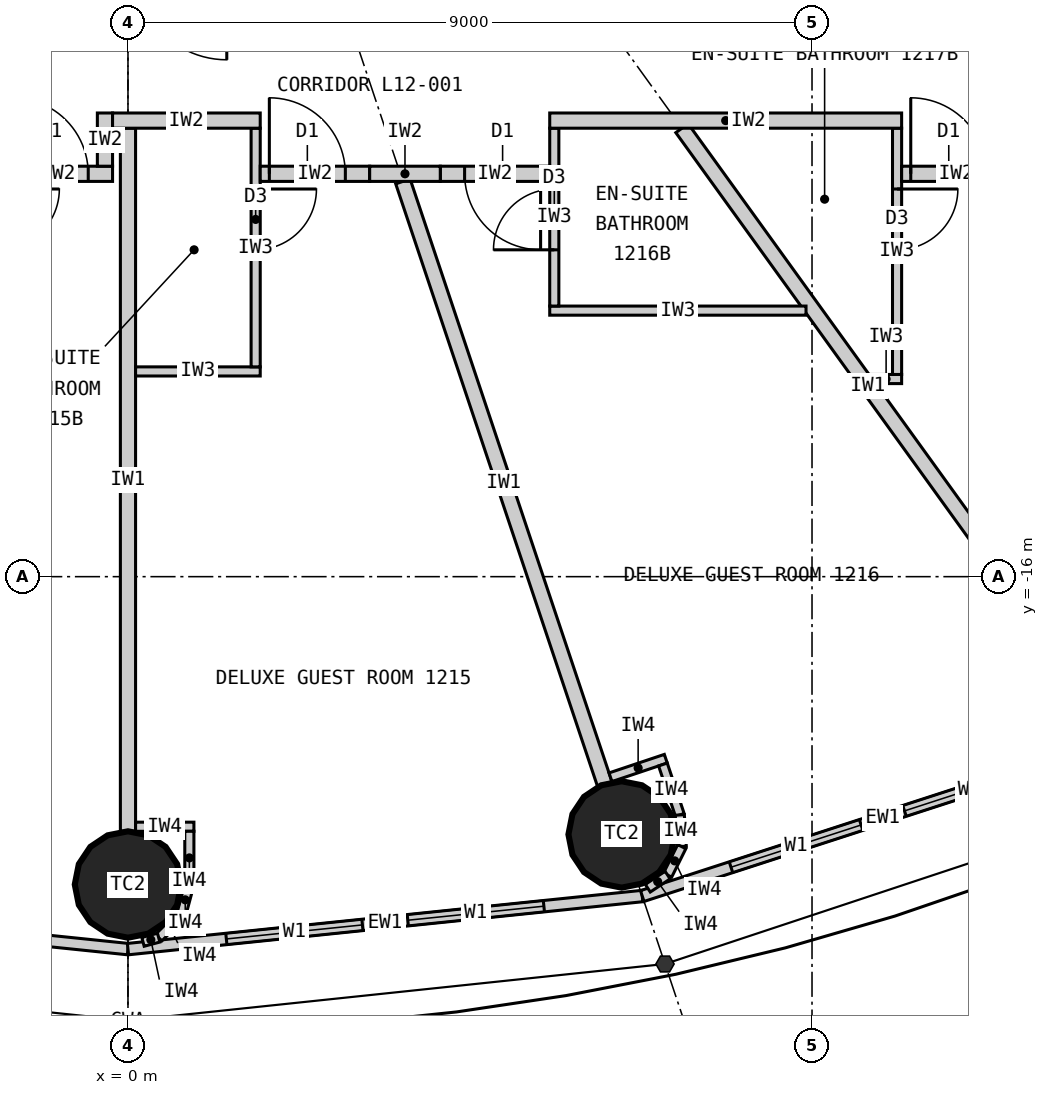
"""IFC4 building model, lengths in metres.
Left out: names, types, materials, properties, quantities, classifications, styles, units other than length and angle.
Written with IfcOpenShell. Run it as: python <this file> out.ifc"""

import sys

from ifc_helpers import new_model, si_unit, direction, frame, frame_2d, origin, origin_2d, place, context, subcontext, project, spatial, rectangle, circle, extrude, element, fill, save


model = new_model("IFC4")
c1 = context("Model", 3, precision=1e-05, world=origin(), true_north=direction((0.0, 1.0)))
c2 = subcontext(c1, "Body", "Model", "MODEL_VIEW")
j1 = project(units=[si_unit("LENGTHUNIT", "METRE"), si_unit("PLANEANGLEUNIT", "RADIAN")], contexts=[c1])
p1 = place(None, origin())
s1 = spatial("IfcSite", under=j1, at=p1, CompositionType="ELEMENT")
p2 = place(p1, origin())
s2 = spatial("IfcBuilding", under=s1, at=p2, CompositionType="ELEMENT")
p3 = place(p2, frame((0.0, 0.0, 54.0)))
s3 = spatial("IfcBuildingStorey", under=s2, at=p3, CompositionType="ELEMENT", Elevation=54.0)
for number, where, z_axis, x_axis in (
    (1, (0.0, -20.05, 0.0), (0.0, 0.0, 1.0), (1.0, 0.0, 0.0)),
    (2, (6.495, -19.391, 0.0), (0.0, 0.0, 1.0), (1.0, 0.0, 0.0)),
):
    element("IfcColumn", number, at=place(p3, frame(where, z_axis=z_axis, x_axis=x_axis)), inside=s3, PredefinedType="COLUMN", context=c2, shape_type="SweptSolid", body=[
        extrude(circle(Radius=0.7, at=origin_2d()), origin(), (0.0, 0.0, 1.0), 3.3),
    ])
p4 = place(p3, frame((-6.766, -20.202, 0.0), z_axis=(0.0, 0.0, 1.0), x_axis=(0.994721394369, -0.102612609291, 0.0)))
e3 = element("IfcWall", 3, at=p4, inside=s3, PredefinedType="ELEMENTEDWALL", context=c2, shape_type="SweptSolid", body=[
    extrude(rectangle(XDim=6.802, YDim=0.15, at=frame_2d((3.401, 0.0))), origin(), (0.0, 0.0, 1.0), 3.12),
])
p5 = place(p4, frame((1.301, 0.0, 0.9)))
e4 = element("IfcOpeningElement", 4, at=p5, cuts=e3, PredefinedType="OPENING", context=c2, shape_type="SweptSolid", body=[
    extrude(rectangle(XDim=1.8, YDim=1.9, at=frame_2d((0.9, 0.95))), frame((0.0, 0.085, 0.0), z_axis=(0.0, -1.0, 0.0), x_axis=(1.0, 0.0, 0.0)), (0.0, 0.0, 1.0), 0.17),
])
p6 = place(p4, frame((3.701, 0.0, 0.9)))
e5 = element("IfcOpeningElement", 5, at=p6, cuts=e3, PredefinedType="OPENING", context=c2, shape_type="SweptSolid", body=[
    extrude(rectangle(XDim=1.8, YDim=1.9, at=frame_2d((0.9, 0.95))), frame((0.0, 0.085, 0.0), z_axis=(0.0, -1.0, 0.0), x_axis=(1.0, 0.0, 0.0)), (0.0, 0.0, 1.0), 0.17),
])
p7 = place(p3, frame((0.0, -20.9, 0.0), z_axis=(0.0, 0.0, 1.0), x_axis=(0.994721394369, 0.102612609291, 0.0)))
e6 = element("IfcWall", 6, at=p7, inside=s3, PredefinedType="ELEMENTEDWALL", context=c2, shape_type="SweptSolid", body=[
    extrude(rectangle(XDim=6.802, YDim=0.15, at=frame_2d((3.401, 0.0))), origin(), (0.0, 0.0, 1.0), 3.12),
])
p8 = place(p7, frame((1.301, 0.0, 0.9)))
e7 = element("IfcOpeningElement", 7, at=p8, cuts=e6, PredefinedType="OPENING", context=c2, shape_type="SweptSolid", body=[
    extrude(rectangle(XDim=1.8, YDim=1.9, at=frame_2d((0.9, 0.95))), frame((0.0, 0.085, 0.0), z_axis=(0.0, -1.0, 0.0), x_axis=(1.0, 0.0, 0.0)), (0.0, 0.0, 1.0), 0.17),
])
p9 = place(p7, frame((3.701, 0.0, 0.9)))
e8 = element("IfcOpeningElement", 8, at=p9, cuts=e6, PredefinedType="OPENING", context=c2, shape_type="SweptSolid", body=[
    extrude(rectangle(XDim=1.8, YDim=1.9, at=frame_2d((0.9, 0.95))), frame((0.0, 0.085, 0.0), z_axis=(0.0, -1.0, 0.0), x_axis=(1.0, 0.0, 0.0)), (0.0, 0.0, 1.0), 0.17),
])
p10 = place(p3, frame((6.766, -20.202, 0.0), z_axis=(0.0, 0.0, 1.0), x_axis=(0.951137534625, 0.308767534285, 0.0)))
e9 = element("IfcWall", 9, at=p10, inside=s3, PredefinedType="ELEMENTEDWALL", context=c2, shape_type="SweptSolid", body=[
    extrude(rectangle(XDim=6.655, YDim=0.15, at=frame_2d((3.328, 0.0))), origin(), (0.0, 0.0, 1.0), 3.12),
])
p11 = place(p10, frame((1.228, 0.0, 0.9)))
e10 = element("IfcOpeningElement", 10, at=p11, cuts=e9, PredefinedType="OPENING", context=c2, shape_type="SweptSolid", body=[
    extrude(rectangle(XDim=1.8, YDim=1.9, at=frame_2d((0.9, 0.95))), frame((0.0, 0.085, 0.0), z_axis=(0.0, -1.0, 0.0), x_axis=(1.0, 0.0, 0.0)), (0.0, 0.0, 1.0), 0.17),
])
p12 = place(p10, frame((3.628, 0.0, 0.9)))
e11 = element("IfcOpeningElement", 11, at=p12, cuts=e9, PredefinedType="OPENING", context=c2, shape_type="SweptSolid", body=[
    extrude(rectangle(XDim=1.8, YDim=1.9, at=frame_2d((0.9, 0.95))), frame((0.0, 0.085, 0.0), z_axis=(0.0, -1.0, 0.0), x_axis=(1.0, 0.0, 0.0)), (0.0, 0.0, 1.0), 0.17),
])
p13 = place(p3, frame((0.0, -10.1, 0.0), z_axis=(0.0, 0.0, 1.0), x_axis=(0.0, -1.0, 0.0)))
e12 = element("IfcWall", 12, at=p13, inside=s3, PredefinedType="PARTITIONING", context=c2, shape_type="SweptSolid", body=[
    extrude(rectangle(XDim=9.25, YDim=0.2, at=frame_2d((4.625, 0.0))), origin(), (0.0, 0.0, 1.0), 2.32),
])
p14 = place(p3, frame((3.617, -10.8, 0.0), z_axis=(0.0, 0.0, 1.0), x_axis=(0.317576599239, -0.948232621046, 0.0)))
e13 = element("IfcWall", 13, at=p14, inside=s3, PredefinedType="PARTITIONING", context=c2, shape_type="SweptSolid", body=[
    extrude(rectangle(XDim=8.36, YDim=0.2, at=frame_2d((4.18, 0.0))), origin(), (0.0, 0.0, 1.0), 2.32),
])
p15 = place(p3, frame((7.289, -10.1, 0.0), z_axis=(0.0, 0.0, 1.0), x_axis=(0.585198353053, -0.810890182197, 0.0)))
e14 = element("IfcWall", 14, at=p15, inside=s3, PredefinedType="PARTITIONING", context=c2, shape_type="SweptSolid", body=[
    extrude(rectangle(XDim=8.36, YDim=0.2, at=frame_2d((4.18, 0.0))), origin(), (0.0, 0.0, 1.0), 2.32),
])
p16 = place(p3, frame((0.1, -13.3, 0.0), z_axis=(0.0, 0.0, 1.0), x_axis=(1.0, 0.0, 0.0)))
e15 = element("IfcWall", 15, at=p16, inside=s3, PredefinedType="PARTITIONING", context=c2, shape_type="SweptSolid", body=[
    extrude(rectangle(XDim=1.64, YDim=0.12, at=frame_2d((0.82, 0.0))), origin(), (0.0, 0.0, 1.0), 3.12),
])
p17 = place(p3, frame((1.68, -10.1, 0.0), z_axis=(0.0, 0.0, 1.0), x_axis=(0.0, -1.0, 0.0)))
e16 = element("IfcWall", 16, at=p17, inside=s3, PredefinedType="PARTITIONING", context=c2, shape_type="SweptSolid", body=[
    extrude(rectangle(XDim=3.14, YDim=0.12, at=frame_2d((1.57, 0.0))), origin(), (0.0, 0.0, 1.0), 3.12),
])
p18 = place(p17, frame((0.8, 0.0, 0.0)))
e17 = element("IfcOpeningElement", 17, at=p18, cuts=e16, PredefinedType="OPENING", context=c2, shape_type="SweptSolid", body=[
    extrude(rectangle(XDim=0.8, YDim=2.1, at=frame_2d((0.4, 1.05))), frame((0.0, 0.07, 0.0), z_axis=(0.0, -1.0, 0.0), x_axis=(1.0, 0.0, 0.0)), (0.0, 0.0, 1.0), 0.14),
])
p19 = place(p3, frame((8.921, -12.5, 0.0), z_axis=(0.0, 0.0, 1.0), x_axis=(-1.0, 0.0, 0.0)))
e18 = element("IfcWall", 18, at=p19, inside=s3, PredefinedType="PARTITIONING", context=c2, shape_type="SweptSolid", body=[
    extrude(rectangle(XDim=3.372, YDim=0.12, at=frame_2d((1.686, 0.0))), origin(), (0.0, 0.0, 1.0), 3.12),
])
p20 = place(p3, frame((5.609, -10.1, 0.0), z_axis=(0.0, 0.0, 1.0), x_axis=(0.0, -1.0, 0.0)))
e19 = element("IfcWall", 19, at=p20, inside=s3, PredefinedType="PARTITIONING", context=c2, shape_type="SweptSolid", body=[
    extrude(rectangle(XDim=2.34, YDim=0.12, at=frame_2d((1.17, 0.0))), origin(), (0.0, 0.0, 1.0), 3.12),
])
p21 = place(p20, frame((0.8, 0.0, 0.0)))
e20 = element("IfcOpeningElement", 20, at=p21, cuts=e19, PredefinedType="OPENING", context=c2, shape_type="SweptSolid", body=[
    extrude(rectangle(XDim=0.8, YDim=2.1, at=frame_2d((0.4, 1.05))), frame((0.0, 0.07, 0.0), z_axis=(0.0, -1.0, 0.0), x_axis=(1.0, 0.0, 0.0)), (0.0, 0.0, 1.0), 0.14),
])
p22 = place(p3, frame((9.771, -13.4, 0.0), z_axis=(0.0, 0.0, 1.0), x_axis=(1.0, 0.0, 0.0)))
e21 = element("IfcWall", 21, at=p22, inside=s3, PredefinedType="PARTITIONING", context=c2, shape_type="SweptSolid", body=[
    extrude(rectangle(XDim=0.408, YDim=0.12, at=frame_2d((0.204, 0.0))), origin(), (0.0, 0.0, 1.0), 3.12),
])
p23 = place(p3, frame((10.119, -10.1, 0.0), z_axis=(0.0, 0.0, 1.0), x_axis=(0.0, -1.0, 0.0)))
e22 = element("IfcWall", 22, at=p23, inside=s3, PredefinedType="PARTITIONING", context=c2, shape_type="SweptSolid", body=[
    extrude(rectangle(XDim=3.24, YDim=0.12, at=frame_2d((1.62, 0.0))), origin(), (0.0, 0.0, 1.0), 3.12),
])
p24 = place(p23, frame((0.8, 0.0, 0.0)))
e23 = element("IfcOpeningElement", 23, at=p24, cuts=e22, PredefinedType="OPENING", context=c2, shape_type="SweptSolid", body=[
    extrude(rectangle(XDim=0.8, YDim=2.1, at=frame_2d((0.4, 1.05))), frame((0.0, 0.07, 0.0), z_axis=(0.0, -1.0, 0.0), x_axis=(1.0, 0.0, 0.0)), (0.0, 0.0, 1.0), 0.14),
])
p25 = place(p3, frame((-0.203, -10.7, 0.0), z_axis=(0.0, 0.0, 1.0), x_axis=(-1.0, 0.0, 0.0)))
e24 = element("IfcWall", 24, at=p25, inside=s3, PredefinedType="PARTITIONING", context=c2, shape_type="SweptSolid", body=[
    extrude(rectangle(XDim=1.44, YDim=0.2, at=frame_2d((0.72, 0.0))), origin(), (0.0, 0.0, 1.0), 3.12),
])
p26 = place(p25, frame((0.32, 0.0, 0.0)))
e25 = element("IfcOpeningElement", 25, at=p26, cuts=e24, PredefinedType="OPENING", context=c2, shape_type="SweptSolid", body=[
    extrude(rectangle(XDim=1.0, YDim=2.2, at=frame_2d((0.5, 1.1))), frame((0.0, 0.11, 0.0), z_axis=(0.0, -1.0, 0.0), x_axis=(1.0, 0.0, 0.0)), (0.0, 0.0, 1.0), 0.22),
])
p27 = place(p3, frame((-0.303, -9.9, 0.0), z_axis=(0.0, 0.0, 1.0), x_axis=(0.0, -1.0, 0.0)))
e26 = element("IfcWall", 26, at=p27, inside=s3, PredefinedType="PARTITIONING", context=c2, shape_type="SweptSolid", body=[
    extrude(rectangle(XDim=0.7, YDim=0.2, at=frame_2d((0.35, 0.0))), origin(), (0.0, 0.0, 1.0), 3.12),
])
p28 = place(p3, frame((3.18, -10.7, 0.0), z_axis=(0.0, 0.0, 1.0), x_axis=(-1.0, 0.0, 0.0)))
e27 = element("IfcWall", 27, at=p28, inside=s3, PredefinedType="PARTITIONING", context=c2, shape_type="SweptSolid", body=[
    extrude(rectangle(XDim=1.44, YDim=0.2, at=frame_2d((0.72, 0.0))), origin(), (0.0, 0.0, 1.0), 3.12),
])
p29 = place(p28, frame((0.32, 0.0, 0.0)))
e28 = element("IfcOpeningElement", 28, at=p29, cuts=e27, PredefinedType="OPENING", context=c2, shape_type="SweptSolid", body=[
    extrude(rectangle(XDim=1.0, YDim=2.2, at=frame_2d((0.5, 1.1))), frame((0.0, 0.11, 0.0), z_axis=(0.0, -1.0, 0.0), x_axis=(1.0, 0.0, 0.0)), (0.0, 0.0, 1.0), 0.22),
])
p30 = place(p3, frame((5.549, -10.7, 0.0), z_axis=(0.0, 0.0, 1.0), x_axis=(-1.0, 0.0, 0.0)))
e29 = element("IfcWall", 29, at=p30, inside=s3, PredefinedType="PARTITIONING", context=c2, shape_type="SweptSolid", body=[
    extrude(rectangle(XDim=1.44, YDim=0.2, at=frame_2d((0.72, 0.0))), origin(), (0.0, 0.0, 1.0), 3.12),
])
p31 = place(p30, frame((0.12, 0.0, 0.0)))
e30 = element("IfcOpeningElement", 30, at=p31, cuts=e29, PredefinedType="OPENING", context=c2, shape_type="SweptSolid", body=[
    extrude(rectangle(XDim=1.0, YDim=2.2, at=frame_2d((0.5, 1.1))), frame((0.0, 0.11, 0.0), z_axis=(0.0, -1.0, 0.0), x_axis=(1.0, 0.0, 0.0)), (0.0, 0.0, 1.0), 0.22),
])
p32 = place(p3, frame((11.619, -10.7, 0.0), z_axis=(0.0, 0.0, 1.0), x_axis=(-1.0, 0.0, 0.0)))
e31 = element("IfcWall", 31, at=p32, inside=s3, PredefinedType="PARTITIONING", context=c2, shape_type="SweptSolid", body=[
    extrude(rectangle(XDim=1.44, YDim=0.2, at=frame_2d((0.72, 0.0))), origin(), (0.0, 0.0, 1.0), 3.12),
])
p33 = place(p32, frame((0.32, 0.0, 0.0)))
e32 = element("IfcOpeningElement", 32, at=p33, cuts=e31, PredefinedType="OPENING", context=c2, shape_type="SweptSolid", body=[
    extrude(rectangle(XDim=1.0, YDim=2.2, at=frame_2d((0.5, 1.1))), frame((0.0, 0.11, 0.0), z_axis=(0.0, -1.0, 0.0), x_axis=(1.0, 0.0, 0.0)), (0.0, 0.0, 1.0), 0.22),
])
p34 = place(p3, frame((4.109, -10.7, 0.0), z_axis=(0.0, 0.0, 1.0), x_axis=(-1.0, 0.0, 0.0)))
e33 = element("IfcWall", 33, at=p34, inside=s3, PredefinedType="PARTITIONING", context=c2, shape_type="SweptSolid", body=[
    extrude(rectangle(XDim=0.929, YDim=0.2, at=frame_2d((0.465, 0.0))), origin(), (0.0, 0.0, 1.0), 3.12),
])
p35 = place(p3, frame((10.179, -10.0, 0.0), z_axis=(0.0, 0.0, 1.0), x_axis=(-1.0, 0.0, 0.0)))
e34 = element("IfcWall", 34, at=p35, inside=s3, PredefinedType="PARTITIONING", context=c2, shape_type="SweptSolid", body=[
    extrude(rectangle(XDim=4.63, YDim=0.2, at=frame_2d((2.315, 0.0))), origin(), (0.0, 0.0, 1.0), 3.12),
])
p36 = place(p3, frame((1.74, -10.0, 0.0), z_axis=(0.0, 0.0, 1.0), x_axis=(-1.0, 0.0, 0.0)))
e35 = element("IfcWall", 35, at=p36, inside=s3, PredefinedType="PARTITIONING", context=c2, shape_type="SweptSolid", body=[
    extrude(rectangle(XDim=1.943, YDim=0.2, at=frame_2d((0.971, 0.0))), origin(), (0.0, 0.0, 1.0), 3.12),
])
p37 = place(p3, frame((0.1, -19.29, 0.0), z_axis=(0.0, 0.0, 1.0), x_axis=(1.0, 0.0, 0.0)))
e36 = element("IfcWall", 36, at=p37, inside=s3, PredefinedType="PARTITIONING", context=c2, shape_type="SweptSolid", body=[
    extrude(rectangle(XDim=0.767, YDim=0.12, at=frame_2d((0.384, 0.0))), origin(), (0.0, 0.0, 1.0), 3.12),
])
p38 = place(p3, frame((0.808, -19.35, 0.0), z_axis=(0.0, 0.0, 1.0), x_axis=(0.0, -1.0, 0.0)))
e37 = element("IfcWall", 37, at=p38, inside=s3, PredefinedType="PARTITIONING", context=c2, shape_type="SweptSolid", body=[
    extrude(rectangle(XDim=0.7, YDim=0.12, at=frame_2d((0.35, 0.0))), origin(), (0.0, 0.0, 1.0), 3.12),
])
p39 = place(p3, frame((0.808, -20.05, 0.0), z_axis=(0.0, 0.0, 1.0), x_axis=(-0.2592614205, -0.965807183573, 0.0)))
e38 = element("IfcWall", 38, at=p39, inside=s3, PredefinedType="PARTITIONING", context=c2, shape_type="SweptSolid", body=[
    extrude(rectangle(XDim=0.418, YDim=0.12, at=frame_2d((0.209, 0.0))), origin(), (0.0, 0.0, 1.0), 3.12),
])
p40 = place(p3, frame((0.699, -20.454, 0.0), z_axis=(0.0, 0.0, 1.0), x_axis=(-0.707106781187, -0.707106781187, 0.0)))
e39 = element("IfcWall", 39, at=p40, inside=s3, PredefinedType="PARTITIONING", context=c2, shape_type="SweptSolid", body=[
    extrude(rectangle(XDim=0.418, YDim=0.12, at=frame_2d((0.209, 0.0))), origin(), (0.0, 0.0, 1.0), 3.12),
])
p41 = place(p3, frame((0.404, -20.749, 0.0), z_axis=(0.0, 0.0, 1.0), x_axis=(-0.965759066438, -0.25944060128, 0.0)))
e40 = element("IfcWall", 40, at=p41, inside=s3, PredefinedType="PARTITIONING", context=c2, shape_type="SweptSolid", body=[
    extrude(rectangle(XDim=0.214, YDim=0.12, at=frame_2d((0.107, 0.0))), origin(), (0.0, 0.0, 1.0), 3.12),
])
p42 = place(p3, frame((6.348, -18.639, 0.0), z_axis=(0.0, 0.0, 1.0), x_axis=(0.948268951266, 0.317468102437, 0.0)))
e41 = element("IfcWall", 41, at=p42, inside=s3, PredefinedType="PARTITIONING", context=c2, shape_type="SweptSolid", body=[
    extrude(rectangle(XDim=0.768, YDim=0.12, at=frame_2d((0.384, 0.0))), origin(), (0.0, 0.0, 1.0), 3.12),
])
p43 = place(p3, frame((7.038, -18.471, 0.0), z_axis=(0.0, 0.0, 1.0), x_axis=(0.317378466199, -0.9482989556, 0.0)))
e42 = element("IfcWall", 42, at=p43, inside=s3, PredefinedType="PARTITIONING", context=c2, shape_type="SweptSolid", body=[
    extrude(rectangle(XDim=0.7, YDim=0.12, at=frame_2d((0.35, 0.0))), origin(), (0.0, 0.0, 1.0), 3.12),
])
p44 = place(p3, frame((7.26, -19.135, 0.0), z_axis=(0.0, 0.0, 1.0), x_axis=(0.0613238046, -0.99811792439, 0.0)))
e43 = element("IfcWall", 43, at=p44, inside=s3, PredefinedType="PARTITIONING", context=c2, shape_type="SweptSolid", body=[
    extrude(rectangle(XDim=0.418, YDim=0.12, at=frame_2d((0.209, 0.0))), origin(), (0.0, 0.0, 1.0), 3.12),
])
p45 = place(p3, frame((7.286, -19.552, 0.0), z_axis=(0.0, 0.0, 1.0), x_axis=(-0.445810757773, -0.89512723579, 0.0)))
e44 = element("IfcWall", 44, at=p45, inside=s3, PredefinedType="PARTITIONING", context=c2, shape_type="SweptSolid", body=[
    extrude(rectangle(XDim=0.418, YDim=0.12, at=frame_2d((0.209, 0.0))), origin(), (0.0, 0.0, 1.0), 3.12),
])
p46 = place(p3, frame((7.1, -19.926, 0.0), z_axis=(0.0, 0.0, 1.0), x_axis=(-0.833488262509, -0.552537162787, 0.0)))
e45 = element("IfcWall", 45, at=p46, inside=s3, PredefinedType="PARTITIONING", context=c2, shape_type="SweptSolid", body=[
    extrude(rectangle(XDim=0.313, YDim=0.12, at=frame_2d((0.156, 0.0))), origin(), (0.0, 0.0, 1.0), 3.12),
])
p47 = place(p8, origin())
e46 = element("IfcWindow", 46, at=p47, inside=s3, PartitioningType="SINGLE_PANEL", PredefinedType="WINDOW", context=c2, shape_type="SweptSolid", body=[
    extrude(rectangle(XDim=1.8, YDim=1.9, at=frame_2d((0.9, 0.95))), frame((0.0, 0.03, 0.0), z_axis=(0.0, -1.0, 0.0), x_axis=(1.0, 0.0, 0.0)), (0.0, 0.0, 1.0), 0.06),
])
fill(e7, e46)
p48 = place(p9, origin())
e47 = element("IfcWindow", 47, at=p48, inside=s3, PartitioningType="SINGLE_PANEL", PredefinedType="WINDOW", context=c2, shape_type="SweptSolid", body=[
    extrude(rectangle(XDim=1.8, YDim=1.9, at=frame_2d((0.9, 0.95))), frame((0.0, 0.03, 0.0), z_axis=(0.0, -1.0, 0.0), x_axis=(1.0, 0.0, 0.0)), (0.0, 0.0, 1.0), 0.06),
])
fill(e8, e47)
p49 = place(p11, origin())
e48 = element("IfcWindow", 48, at=p49, inside=s3, PartitioningType="SINGLE_PANEL", PredefinedType="WINDOW", context=c2, shape_type="SweptSolid", body=[
    extrude(rectangle(XDim=1.8, YDim=1.9, at=frame_2d((0.9, 0.95))), frame((0.0, 0.03, 0.0), z_axis=(0.0, -1.0, 0.0), x_axis=(1.0, 0.0, 0.0)), (0.0, 0.0, 1.0), 0.06),
])
fill(e10, e48)
p50 = place(p12, origin())
e49 = element("IfcWindow", 49, at=p50, inside=s3, PartitioningType="SINGLE_PANEL", PredefinedType="WINDOW", context=c2, shape_type="SweptSolid", body=[
    extrude(rectangle(XDim=1.8, YDim=1.9, at=frame_2d((0.9, 0.95))), frame((0.0, 0.03, 0.0), z_axis=(0.0, -1.0, 0.0), x_axis=(1.0, 0.0, 0.0)), (0.0, 0.0, 1.0), 0.06),
])
fill(e11, e49)
p51 = place(p26, origin())
e50 = element("IfcDoor", 50, at=p51, inside=s3, OperationType="SINGLE_SWING_RIGHT", PredefinedType="DOOR", context=c2, shape_type="SweptSolid", body=[
    extrude(rectangle(XDim=1.0, YDim=2.2, at=frame_2d((0.5, 1.1))), frame((0.0, 0.025, 0.0), z_axis=(0.0, -1.0, 0.0), x_axis=(1.0, 0.0, 0.0)), (0.0, 0.0, 1.0), 0.05),
])
fill(e25, e50)
p52 = place(p18, origin())
e51 = element("IfcDoor", 51, at=p52, inside=s3, OperationType="SINGLE_SWING_LEFT", PredefinedType="DOOR", context=c2, shape_type="SweptSolid", body=[
    extrude(rectangle(XDim=0.8, YDim=2.1, at=frame_2d((0.4, 1.05))), frame((0.0, 0.025, 0.0), z_axis=(0.0, -1.0, 0.0), x_axis=(1.0, 0.0, 0.0)), (0.0, 0.0, 1.0), 0.05),
])
fill(e17, e51)
p53 = place(p29, origin())
e52 = element("IfcDoor", 52, at=p53, inside=s3, OperationType="SINGLE_SWING_RIGHT", PredefinedType="DOOR", context=c2, shape_type="SweptSolid", body=[
    extrude(rectangle(XDim=1.0, YDim=2.2, at=frame_2d((0.5, 1.1))), frame((0.0, 0.025, 0.0), z_axis=(0.0, -1.0, 0.0), x_axis=(1.0, 0.0, 0.0)), (0.0, 0.0, 1.0), 0.05),
])
fill(e28, e52)
p54 = place(p21, origin())
e53 = element("IfcDoor", 53, at=p54, inside=s3, OperationType="SINGLE_SWING_RIGHT", PredefinedType="DOOR", context=c2, shape_type="SweptSolid", body=[
    extrude(rectangle(XDim=0.8, YDim=2.1, at=frame_2d((0.4, 1.05))), frame((0.0, 0.025, 0.0), z_axis=(0.0, -1.0, 0.0), x_axis=(1.0, 0.0, 0.0)), (0.0, 0.0, 1.0), 0.05),
])
fill(e20, e53)
p55 = place(p31, origin())
e54 = element("IfcDoor", 54, at=p55, inside=s3, OperationType="SINGLE_SWING_LEFT", PredefinedType="DOOR", context=c2, shape_type="SweptSolid", body=[
    extrude(rectangle(XDim=1.0, YDim=2.2, at=frame_2d((0.5, 1.1))), frame((0.0, 0.025, 0.0), z_axis=(0.0, -1.0, 0.0), x_axis=(1.0, 0.0, 0.0)), (0.0, 0.0, 1.0), 0.05),
])
fill(e30, e54)
p56 = place(p24, origin())
e55 = element("IfcDoor", 55, at=p56, inside=s3, OperationType="SINGLE_SWING_LEFT", PredefinedType="DOOR", context=c2, shape_type="SweptSolid", body=[
    extrude(rectangle(XDim=0.8, YDim=2.1, at=frame_2d((0.4, 1.05))), frame((0.0, 0.025, 0.0), z_axis=(0.0, -1.0, 0.0), x_axis=(1.0, 0.0, 0.0)), (0.0, 0.0, 1.0), 0.05),
])
fill(e23, e55)
p57 = place(p33, origin())
e56 = element("IfcDoor", 56, at=p57, inside=s3, OperationType="SINGLE_SWING_RIGHT", PredefinedType="DOOR", context=c2, shape_type="SweptSolid", body=[
    extrude(rectangle(XDim=1.0, YDim=2.2, at=frame_2d((0.5, 1.1))), frame((0.0, 0.025, 0.0), z_axis=(0.0, -1.0, 0.0), x_axis=(1.0, 0.0, 0.0)), (0.0, 0.0, 1.0), 0.05),
])
fill(e32, e56)
save(model, sys.argv[1])
